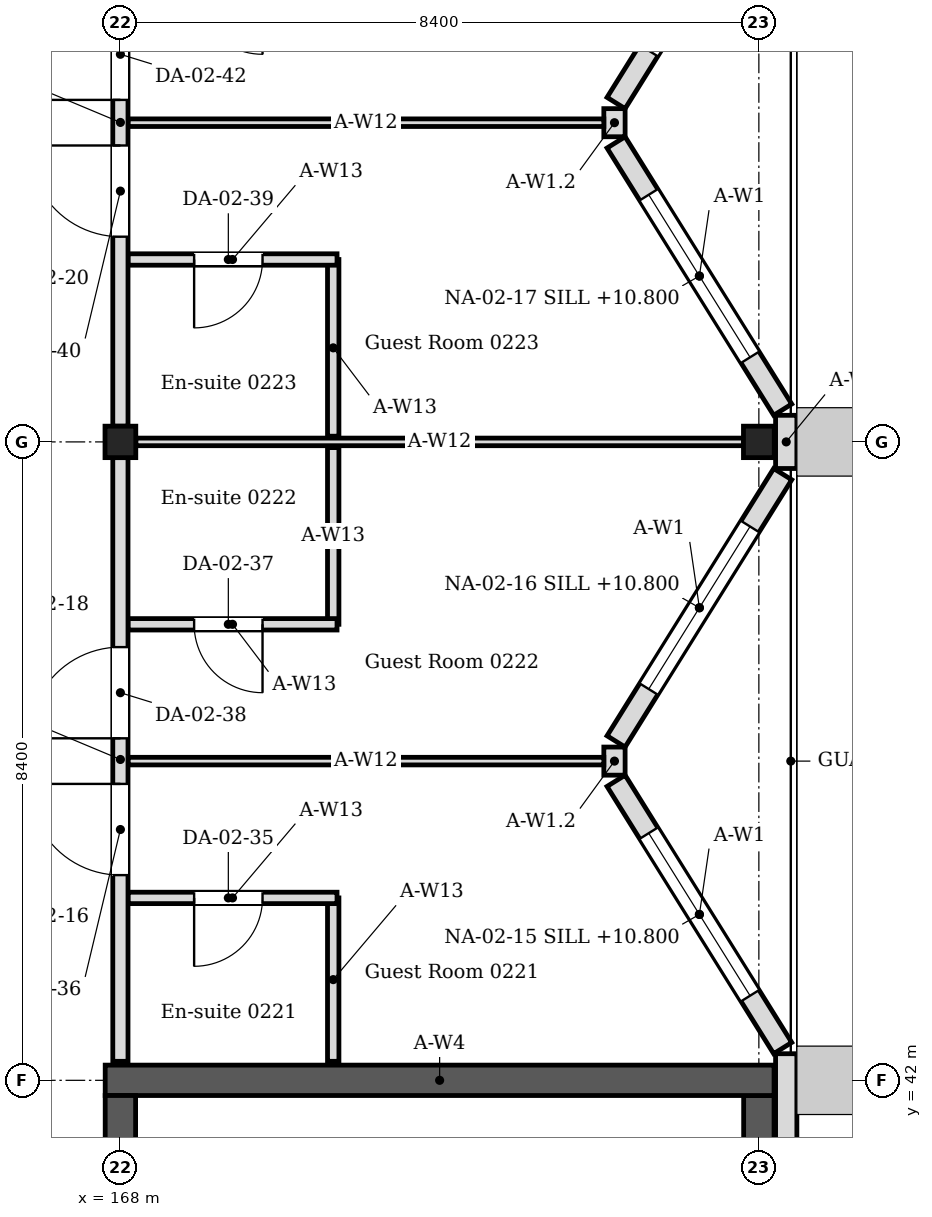
"""IFC4 building model, lengths in metres.
Left out: names, types, materials, properties, quantities, classifications, styles, units other than length and angle.
Written with IfcOpenShell. Run it as: python <this file> out.ifc"""

import sys

from ifc_helpers import new_model, si_unit, direction, frame, frame_2d, origin, origin_2d, place, context, subcontext, project, spatial, rectangle, i_section, extrude, element, fill, save


model = new_model("IFC4")
c1 = context("Model", 3, precision=1e-05, world=origin(), true_north=direction((0.0, 1.0)))
c2 = subcontext(c1, "Body", "Model", "MODEL_VIEW")
j1 = project(units=[si_unit("LENGTHUNIT", "METRE"), si_unit("PLANEANGLEUNIT", "RADIAN")], contexts=[c1])
p1 = place(None, origin())
s1 = spatial("IfcSite", under=j1, at=p1, CompositionType="ELEMENT")
p2 = place(p1, origin())
s2 = spatial("IfcBuilding", under=s1, at=p2, CompositionType="ELEMENT")
p3 = place(p2, frame((0.0, 0.0, 10.2)))
s3 = spatial("IfcBuildingStorey", under=s2, at=p3, CompositionType="ELEMENT", Elevation=10.2)
for number, where, z_axis, x_axis in (
    (1, (168.0, 50.4, 0.0), (0.0, 0.0, 1.0), (1.0, 0.0, 0.0)),
    (2, (176.4, 50.4, 0.0), (0.0, 0.0, 1.0), (1.0, 0.0, 0.0)),
):
    element("IfcColumn", number, at=place(p3, frame(where, z_axis=z_axis, x_axis=x_axis)), inside=s3, PredefinedType="COLUMN", context=c2, shape_type="SweptSolid", body=[
        extrude(i_section(OverallWidth=0.405, OverallDepth=0.414, WebThickness=0.018, FlangeThickness=0.028, FilletRadius=0.022, at=origin_2d()), origin(), (0.0, 0.0, 1.0), 4.2),
    ])
p4 = place(p3, frame((167.8, 42.0, 0.0), z_axis=(0.0, 0.0, 1.0), x_axis=(1.0, 0.0, 0.0)))
e3 = element("IfcWall", 3, at=p4, inside=s3, PredefinedType="SOLIDWALL", context=c2, shape_type="SweptSolid", body=[
    extrude(rectangle(XDim=8.8, YDim=0.4, at=frame_2d((4.4, 0.0))), origin(), (0.0, 0.0, 1.0), 4.05),
])
p5 = place(p3, frame((168.0, 25.4, 0.0), z_axis=(0.0, 0.0, 1.0), x_axis=(0.0, 1.0, 0.0)))
e4 = element("IfcWall", 4, at=p5, inside=s3, PredefinedType="SOLIDWALL", context=c2, shape_type="SweptSolid", body=[
    extrude(rectangle(XDim=16.4, YDim=0.4, at=frame_2d((8.2, 0.0))), origin(), (0.0, 0.0, 1.0), 4.05),
])
p6 = place(p5, frame((1.0, 0.0, 0.0)))
e5 = element("IfcOpeningElement", 5, at=p6, cuts=e4, PredefinedType="OPENING", context=c2, shape_type="SweptSolid", body=[
    extrude(rectangle(XDim=1.0, YDim=2.1, at=frame_2d((0.5, 1.05))), frame((0.0, 0.21, 0.0), z_axis=(0.0, -1.0, 0.0), x_axis=(1.0, 0.0, 0.0)), (0.0, 0.0, 1.0), 0.42),
])
p7 = place(p5, frame((14.4, 0.0, 0.0)))
e6 = element("IfcOpeningElement", 6, at=p7, cuts=e4, PredefinedType="OPENING", context=c2, shape_type="SweptSolid", body=[
    extrude(rectangle(XDim=1.4, YDim=2.1, at=frame_2d((0.7, 1.05))), frame((0.0, 0.21, 0.0), z_axis=(0.0, -1.0, 0.0), x_axis=(1.0, 0.0, 0.0)), (0.0, 0.0, 1.0), 0.42),
])
p8 = place(p3, frame((176.4, 25.4, 0.0), z_axis=(0.0, 0.0, 1.0), x_axis=(0.0, 1.0, 0.0)))
e7 = element("IfcWall", 7, at=p8, inside=s3, PredefinedType="SOLIDWALL", context=c2, shape_type="SweptSolid", body=[
    extrude(rectangle(XDim=16.4, YDim=0.4, at=frame_2d((8.2, 0.0))), origin(), (0.0, 0.0, 1.0), 4.05),
])
p9 = place(p3, frame((176.76, -0.22, 0.0), z_axis=(0.0, 0.0, 1.0), x_axis=(0.0, 1.0, 0.0)))
e8 = element("IfcWall", 8, at=p9, inside=s3, PredefinedType="SOLIDWALL", context=c2, shape_type="SweptSolid", body=[
    extrude(rectangle(XDim=42.57, YDim=0.28, at=frame_2d((21.285, 0.0))), origin(), (0.0, 0.0, 1.0), 4.05),
])
p10 = place(p9, frame((9.46, 0.0, 0.6)))
e9 = element("IfcOpeningElement", 9, at=p10, cuts=e8, PredefinedType="OPENING", context=c2, shape_type="SweptSolid", body=[
    extrude(rectangle(XDim=2.52, YDim=2.4, at=frame_2d((1.26, 1.2))), frame((0.0, 0.15, 0.0), z_axis=(0.0, -1.0, 0.0), x_axis=(1.0, 0.0, 0.0)), (0.0, 0.0, 1.0), 0.3),
])
p11 = place(p9, frame((13.66, 0.0, 0.6)))
e10 = element("IfcOpeningElement", 10, at=p11, cuts=e8, PredefinedType="OPENING", context=c2, shape_type="SweptSolid", body=[
    extrude(rectangle(XDim=2.52, YDim=2.4, at=frame_2d((1.26, 1.2))), frame((0.0, 0.15, 0.0), z_axis=(0.0, -1.0, 0.0), x_axis=(1.0, 0.0, 0.0)), (0.0, 0.0, 1.0), 0.3),
])
p12 = place(p9, frame((17.86, 0.0, 0.6)))
e11 = element("IfcOpeningElement", 11, at=p12, cuts=e8, PredefinedType="OPENING", context=c2, shape_type="SweptSolid", body=[
    extrude(rectangle(XDim=2.52, YDim=2.4, at=frame_2d((1.26, 1.2))), frame((0.0, 0.15, 0.0), z_axis=(0.0, -1.0, 0.0), x_axis=(1.0, 0.0, 0.0)), (0.0, 0.0, 1.0), 0.3),
])
p13 = place(p9, frame((22.06, 0.0, 0.6)))
e12 = element("IfcOpeningElement", 12, at=p13, cuts=e8, PredefinedType="OPENING", context=c2, shape_type="SweptSolid", body=[
    extrude(rectangle(XDim=2.52, YDim=2.4, at=frame_2d((1.26, 1.2))), frame((0.0, 0.15, 0.0), z_axis=(0.0, -1.0, 0.0), x_axis=(1.0, 0.0, 0.0)), (0.0, 0.0, 1.0), 0.3),
])
p14 = place(p3, frame((176.714, 42.424, 0.0), z_axis=(0.0, 0.0, 1.0), x_axis=(-0.529018946142, 0.848610013271, 0.0)))
e13 = element("IfcWall", 13, at=p14, inside=s3, PredefinedType="SOLIDWALL", context=c2, shape_type="SweptSolid", body=[
    extrude(rectangle(XDim=4.144, YDim=0.28, at=frame_2d((2.072, 0.0))), origin(), (0.0, 0.0, 1.0), 4.05),
])
p15 = place(p14, frame((0.812, 0.0, 0.6)))
e14 = element("IfcOpeningElement", 14, at=p15, cuts=e13, PredefinedType="OPENING", context=c2, shape_type="SweptSolid", body=[
    extrude(rectangle(XDim=2.52, YDim=2.4, at=frame_2d((1.26, 1.2))), frame((0.0, 0.15, 0.0), z_axis=(0.0, -1.0, 0.0), x_axis=(1.0, 0.0, 0.0)), (0.0, 0.0, 1.0), 0.3),
])
p16 = place(p3, frame((174.521, 46.459, 0.0), z_axis=(0.0, 0.0, 1.0), x_axis=(0.529018946142, 0.848610013271, 0.0)))
e15 = element("IfcWall", 15, at=p16, inside=s3, PredefinedType="SOLIDWALL", context=c2, shape_type="SweptSolid", body=[
    extrude(rectangle(XDim=4.144, YDim=0.28, at=frame_2d((2.072, 0.0))), origin(), (0.0, 0.0, 1.0), 4.05),
])
p17 = place(p16, frame((0.812, 0.0, 0.6)))
e16 = element("IfcOpeningElement", 16, at=p17, cuts=e15, PredefinedType="OPENING", context=c2, shape_type="SweptSolid", body=[
    extrude(rectangle(XDim=2.52, YDim=2.4, at=frame_2d((1.26, 1.2))), frame((0.0, 0.15, 0.0), z_axis=(0.0, -1.0, 0.0), x_axis=(1.0, 0.0, 0.0)), (0.0, 0.0, 1.0), 0.3),
])
p18 = place(p3, frame((174.5, 46.015, 0.0), z_axis=(0.0, 0.0, 1.0), x_axis=(0.0, 1.0, 0.0)))
e17 = element("IfcWall", 17, at=p18, inside=s3, PredefinedType="SOLIDWALL", context=c2, shape_type="SweptSolid", body=[
    extrude(rectangle(XDim=0.37, YDim=0.28, at=frame_2d((0.185, 0.0))), origin(), (0.0, 0.0, 1.0), 3.604),
])
p19 = place(p3, frame((176.76, 50.05, 0.0), z_axis=(0.0, 0.0, 1.0), x_axis=(0.0, 1.0, 0.0)))
e18 = element("IfcWall", 18, at=p19, inside=s3, PredefinedType="SOLIDWALL", context=c2, shape_type="SweptSolid", body=[
    extrude(rectangle(XDim=0.7, YDim=0.28, at=frame_2d((0.35, 0.0))), origin(), (0.0, 0.0, 1.0), 4.05),
])
p20 = place(p3, frame((176.714, 50.824, 0.0), z_axis=(0.0, 0.0, 1.0), x_axis=(-0.529018946142, 0.848610013271, 0.0)))
e19 = element("IfcWall", 19, at=p20, inside=s3, PredefinedType="SOLIDWALL", context=c2, shape_type="SweptSolid", body=[
    extrude(rectangle(XDim=4.144, YDim=0.28, at=frame_2d((2.072, 0.0))), origin(), (0.0, 0.0, 1.0), 4.05),
])
p21 = place(p20, frame((0.812, 0.0, 0.6)))
e20 = element("IfcOpeningElement", 20, at=p21, cuts=e19, PredefinedType="OPENING", context=c2, shape_type="SweptSolid", body=[
    extrude(rectangle(XDim=2.52, YDim=2.4, at=frame_2d((1.26, 1.2))), frame((0.0, 0.15, 0.0), z_axis=(0.0, -1.0, 0.0), x_axis=(1.0, 0.0, 0.0)), (0.0, 0.0, 1.0), 0.3),
])
p22 = place(p3, frame((174.521, 54.859, 0.0), z_axis=(0.0, 0.0, 1.0), x_axis=(0.528992500338, 0.848626498871, 0.0)))
e21 = element("IfcWall", 21, at=p22, inside=s3, PredefinedType="SOLIDWALL", context=c2, shape_type="SweptSolid", body=[
    extrude(rectangle(XDim=4.145, YDim=0.28, at=frame_2d((2.072, 0.0))), origin(), (0.0, 0.0, 1.0), 4.05),
])
p23 = place(p22, frame((0.812, 0.0, 0.6)))
e22 = element("IfcOpeningElement", 22, at=p23, cuts=e21, PredefinedType="OPENING", context=c2, shape_type="SweptSolid", body=[
    extrude(rectangle(XDim=2.52, YDim=2.4, at=frame_2d((1.26, 1.2))), frame((0.0, 0.15, 0.0), z_axis=(0.0, -1.0, 0.0), x_axis=(1.0, 0.0, 0.0)), (0.0, 0.0, 1.0), 0.3),
])
p24 = place(p3, frame((174.5, 54.415, 0.0), z_axis=(0.0, 0.0, 1.0), x_axis=(0.0, 1.0, 0.0)))
e23 = element("IfcWall", 23, at=p24, inside=s3, PredefinedType="SOLIDWALL", context=c2, shape_type="SweptSolid", body=[
    extrude(rectangle(XDim=0.37, YDim=0.28, at=frame_2d((0.185, 0.0))), origin(), (0.0, 0.0, 1.0), 3.604),
])
p25 = place(p3, frame((170.8, 42.25, 0.0), z_axis=(0.0, 0.0, 1.0), x_axis=(0.0, 1.0, 0.0)))
e24 = element("IfcWall", 24, at=p25, inside=s3, PredefinedType="PARTITIONING", context=c2, shape_type="SweptSolid", body=[
    extrude(rectangle(XDim=2.15, YDim=0.15, at=frame_2d((1.075, 0.0))), origin(), (0.0, 0.0, 1.0), 4.05),
])
p26 = place(p3, frame((170.85, 44.4, 0.0), z_axis=(0.0, 0.0, 1.0), x_axis=(-1.0, 0.0, 0.0)))
e25 = element("IfcWall", 25, at=p26, inside=s3, PredefinedType="PARTITIONING", context=c2, shape_type="SweptSolid", body=[
    extrude(rectangle(XDim=2.75, YDim=0.15, at=frame_2d((1.375, 0.0))), origin(), (0.0, 0.0, 1.0), 4.05),
])
p27 = place(p26, frame((0.98, 0.0, 0.0)))
e26 = element("IfcOpeningElement", 26, at=p27, cuts=e25, PredefinedType="OPENING", context=c2, shape_type="SweptSolid", body=[
    extrude(rectangle(XDim=0.9, YDim=2.1, at=frame_2d((0.45, 1.05))), frame((0.0, 0.085, 0.0), z_axis=(0.0, -1.0, 0.0), x_axis=(1.0, 0.0, 0.0)), (0.0, 0.0, 1.0), 0.17),
])
p28 = place(p3, frame((170.8, 48.0, 0.0), z_axis=(0.0, 0.0, 1.0), x_axis=(0.0, 1.0, 0.0)))
e27 = element("IfcWall", 27, at=p28, inside=s3, PredefinedType="PARTITIONING", context=c2, shape_type="SweptSolid", body=[
    extrude(rectangle(XDim=2.325, YDim=0.15, at=frame_2d((1.163, 0.0))), origin(), (0.0, 0.0, 1.0), 4.05),
])
p29 = place(p3, frame((170.85, 48.0, 0.0), z_axis=(0.0, 0.0, 1.0), x_axis=(-1.0, 0.0, 0.0)))
e28 = element("IfcWall", 28, at=p29, inside=s3, PredefinedType="PARTITIONING", context=c2, shape_type="SweptSolid", body=[
    extrude(rectangle(XDim=2.75, YDim=0.15, at=frame_2d((1.375, 0.0))), origin(), (0.0, 0.0, 1.0), 4.05),
])
p30 = place(p29, frame((0.98, 0.0, 0.0)))
e29 = element("IfcOpeningElement", 29, at=p30, cuts=e28, PredefinedType="OPENING", context=c2, shape_type="SweptSolid", body=[
    extrude(rectangle(XDim=0.9, YDim=2.1, at=frame_2d((0.45, 1.05))), frame((0.0, 0.085, 0.0), z_axis=(0.0, -1.0, 0.0), x_axis=(1.0, 0.0, 0.0)), (0.0, 0.0, 1.0), 0.17),
])
p31 = place(p3, frame((170.8, 50.475, 0.0), z_axis=(0.0, 0.0, 1.0), x_axis=(0.0, 1.0, 0.0)))
e30 = element("IfcWall", 30, at=p31, inside=s3, PredefinedType="PARTITIONING", context=c2, shape_type="SweptSolid", body=[
    extrude(rectangle(XDim=2.325, YDim=0.15, at=frame_2d((1.163, 0.0))), origin(), (0.0, 0.0, 1.0), 4.05),
])
p32 = place(p3, frame((170.85, 52.8, 0.0), z_axis=(0.0, 0.0, 1.0), x_axis=(-1.0, 0.0, 0.0)))
e31 = element("IfcWall", 31, at=p32, inside=s3, PredefinedType="PARTITIONING", context=c2, shape_type="SweptSolid", body=[
    extrude(rectangle(XDim=2.75, YDim=0.15, at=frame_2d((1.375, 0.0))), origin(), (0.0, 0.0, 1.0), 4.05),
])
p33 = place(p32, frame((0.98, 0.0, 0.0)))
e32 = element("IfcOpeningElement", 32, at=p33, cuts=e31, PredefinedType="OPENING", context=c2, shape_type="SweptSolid", body=[
    extrude(rectangle(XDim=0.9, YDim=2.1, at=frame_2d((0.45, 1.05))), frame((0.0, 0.085, 0.0), z_axis=(0.0, -1.0, 0.0), x_axis=(1.0, 0.0, 0.0)), (0.0, 0.0, 1.0), 0.17),
])
p34 = place(p3, frame((168.202, 50.4, 0.0), z_axis=(0.0, 0.0, 1.0), x_axis=(1.0, 0.0, 0.0)))
e33 = element("IfcWall", 33, at=p34, inside=s3, PredefinedType="PARTITIONING", context=c2, shape_type="SweptSolid", body=[
    extrude(rectangle(XDim=7.995, YDim=0.1, at=frame_2d((3.998, 0.0))), origin(), (0.0, 0.0, 1.0), 3.604),
])
for number, where, z_axis, x_axis in (
    (34, (168.1, 46.2, 0.0), (0.0, 0.0, 1.0), (1.0, 0.0, 0.0)),
    (35, (168.1, 54.6, 0.0), (0.0, 0.0, 1.0), (1.0, 0.0, 0.0)),
):
    element("IfcWall", number, at=place(p3, frame(where, z_axis=z_axis, x_axis=x_axis)), inside=s3, PredefinedType="PARTITIONING", context=c2, shape_type="SweptSolid", body=[
        extrude(rectangle(XDim=6.26, YDim=0.1, at=frame_2d((3.13, 0.0))), origin(), (0.0, 0.0, 1.0), 3.604),
    ])
p35 = place(p3, frame((168.0, 42.25, 0.0), z_axis=(0.0, 0.0, 1.0), x_axis=(0.0, 1.0, 0.0)))
e36 = element("IfcWall", 36, at=p35, inside=s3, PredefinedType="PARTITIONING", context=c2, shape_type="SweptSolid", body=[
    extrude(rectangle(XDim=7.943, YDim=0.2, at=frame_2d((3.972, 0.0))), origin(), (0.0, 0.0, 1.0), 3.45),
])
p36 = place(p35, frame((2.45, 0.0, 0.0)))
e37 = element("IfcOpeningElement", 37, at=p36, cuts=e36, PredefinedType="OPENING", context=c2, shape_type="SweptSolid", body=[
    extrude(rectangle(XDim=1.2, YDim=2.1, at=frame_2d((0.6, 1.05))), frame((0.0, 0.11, 0.0), z_axis=(0.0, -1.0, 0.0), x_axis=(1.0, 0.0, 0.0)), (0.0, 0.0, 1.0), 0.22),
])
p37 = place(p35, frame((4.25, 0.0, 0.0)))
e38 = element("IfcOpeningElement", 38, at=p37, cuts=e36, PredefinedType="OPENING", context=c2, shape_type="SweptSolid", body=[
    extrude(rectangle(XDim=1.2, YDim=2.1, at=frame_2d((0.6, 1.05))), frame((0.0, 0.11, 0.0), z_axis=(0.0, -1.0, 0.0), x_axis=(1.0, 0.0, 0.0)), (0.0, 0.0, 1.0), 0.22),
])
p38 = place(p3, frame((168.0, 50.607, 0.0), z_axis=(0.0, 0.0, 1.0), x_axis=(0.0, 1.0, 0.0)))
e39 = element("IfcWall", 39, at=p38, inside=s3, PredefinedType="PARTITIONING", context=c2, shape_type="SweptSolid", body=[
    extrude(rectangle(XDim=7.993, YDim=0.2, at=frame_2d((3.997, 0.0))), origin(), (0.0, 0.0, 1.0), 3.45),
])
p39 = place(p38, frame((2.493, 0.0, 0.0)))
e40 = element("IfcOpeningElement", 40, at=p39, cuts=e39, PredefinedType="OPENING", context=c2, shape_type="SweptSolid", body=[
    extrude(rectangle(XDim=1.2, YDim=2.1, at=frame_2d((0.6, 1.05))), frame((0.0, 0.11, 0.0), z_axis=(0.0, -1.0, 0.0), x_axis=(1.0, 0.0, 0.0)), (0.0, 0.0, 1.0), 0.22),
])
p40 = place(p38, frame((4.293, 0.0, 0.0)))
e41 = element("IfcOpeningElement", 41, at=p40, cuts=e39, PredefinedType="OPENING", context=c2, shape_type="SweptSolid", body=[
    extrude(rectangle(XDim=1.2, YDim=2.1, at=frame_2d((0.6, 1.05))), frame((0.0, 0.11, 0.0), z_axis=(0.0, -1.0, 0.0), x_axis=(1.0, 0.0, 0.0)), (0.0, 0.0, 1.0), 0.22),
])
p41 = place(p15, origin())
e42 = element("IfcWindow", 42, at=p41, inside=s3, PartitioningType="SINGLE_PANEL", PredefinedType="WINDOW", context=c2, shape_type="SweptSolid", body=[
    extrude(rectangle(XDim=2.52, YDim=2.4, at=frame_2d((1.26, 1.2))), frame((0.0, 0.03, 0.0), z_axis=(0.0, -1.0, 0.0), x_axis=(1.0, 0.0, 0.0)), (0.0, 0.0, 1.0), 0.06),
])
fill(e14, e42)
p42 = place(p17, origin())
e43 = element("IfcWindow", 43, at=p42, inside=s3, PartitioningType="SINGLE_PANEL", PredefinedType="WINDOW", context=c2, shape_type="SweptSolid", body=[
    extrude(rectangle(XDim=2.52, YDim=2.4, at=frame_2d((1.26, 1.2))), frame((0.0, 0.03, 0.0), z_axis=(0.0, -1.0, 0.0), x_axis=(1.0, 0.0, 0.0)), (0.0, 0.0, 1.0), 0.06),
])
fill(e16, e43)
p43 = place(p21, origin())
e44 = element("IfcWindow", 44, at=p43, inside=s3, PartitioningType="SINGLE_PANEL", PredefinedType="WINDOW", context=c2, shape_type="SweptSolid", body=[
    extrude(rectangle(XDim=2.52, YDim=2.4, at=frame_2d((1.26, 1.2))), frame((0.0, 0.03, 0.0), z_axis=(0.0, -1.0, 0.0), x_axis=(1.0, 0.0, 0.0)), (0.0, 0.0, 1.0), 0.06),
])
fill(e20, e44)
p44 = place(p27, origin())
e45 = element("IfcDoor", 45, at=p44, inside=s3, OperationType="SINGLE_SWING_RIGHT", PredefinedType="DOOR", context=c2, shape_type="SweptSolid", body=[
    extrude(rectangle(XDim=0.9, YDim=2.1, at=frame_2d((0.45, 1.05))), frame((0.0, 0.025, 0.0), z_axis=(0.0, -1.0, 0.0), x_axis=(1.0, 0.0, 0.0)), (0.0, 0.0, 1.0), 0.05),
])
fill(e26, e45)
p45 = place(p36, origin())
e46 = element("IfcDoor", 46, at=p45, inside=s3, OperationType="SINGLE_SWING_RIGHT", PredefinedType="DOOR", context=c2, shape_type="SweptSolid", body=[
    extrude(rectangle(XDim=1.2, YDim=2.1, at=frame_2d((0.6, 1.05))), frame((0.0, 0.025, 0.0), z_axis=(0.0, -1.0, 0.0), x_axis=(1.0, 0.0, 0.0)), (0.0, 0.0, 1.0), 0.05),
])
fill(e37, e46)
p46 = place(p30, origin())
e47 = element("IfcDoor", 47, at=p46, inside=s3, OperationType="SINGLE_SWING_LEFT", PredefinedType="DOOR", context=c2, shape_type="SweptSolid", body=[
    extrude(rectangle(XDim=0.9, YDim=2.1, at=frame_2d((0.45, 1.05))), frame((0.0, 0.025, 0.0), z_axis=(0.0, -1.0, 0.0), x_axis=(1.0, 0.0, 0.0)), (0.0, 0.0, 1.0), 0.05),
])
fill(e29, e47)
p47 = place(p37, origin())
e48 = element("IfcDoor", 48, at=p47, inside=s3, OperationType="SINGLE_SWING_LEFT", PredefinedType="DOOR", context=c2, shape_type="SweptSolid", body=[
    extrude(rectangle(XDim=1.2, YDim=2.1, at=frame_2d((0.6, 1.05))), frame((0.0, 0.025, 0.0), z_axis=(0.0, -1.0, 0.0), x_axis=(1.0, 0.0, 0.0)), (0.0, 0.0, 1.0), 0.05),
])
fill(e38, e48)
p48 = place(p33, origin())
e49 = element("IfcDoor", 49, at=p48, inside=s3, OperationType="SINGLE_SWING_RIGHT", PredefinedType="DOOR", context=c2, shape_type="SweptSolid", body=[
    extrude(rectangle(XDim=0.9, YDim=2.1, at=frame_2d((0.45, 1.05))), frame((0.0, 0.025, 0.0), z_axis=(0.0, -1.0, 0.0), x_axis=(1.0, 0.0, 0.0)), (0.0, 0.0, 1.0), 0.05),
])
fill(e32, e49)
p49 = place(p39, origin())
e50 = element("IfcDoor", 50, at=p49, inside=s3, OperationType="SINGLE_SWING_RIGHT", PredefinedType="DOOR", context=c2, shape_type="SweptSolid", body=[
    extrude(rectangle(XDim=1.2, YDim=2.1, at=frame_2d((0.6, 1.05))), frame((0.0, 0.025, 0.0), z_axis=(0.0, -1.0, 0.0), x_axis=(1.0, 0.0, 0.0)), (0.0, 0.0, 1.0), 0.05),
])
fill(e40, e50)
p50 = place(p40, origin())
e51 = element("IfcDoor", 51, at=p50, inside=s3, OperationType="SINGLE_SWING_LEFT", PredefinedType="DOOR", context=c2, shape_type="SweptSolid", body=[
    extrude(rectangle(XDim=1.2, YDim=2.1, at=frame_2d((0.6, 1.05))), frame((0.0, 0.025, 0.0), z_axis=(0.0, -1.0, 0.0), x_axis=(1.0, 0.0, 0.0)), (0.0, 0.0, 1.0), 0.05),
])
fill(e41, e51)
save(model, sys.argv[1])
